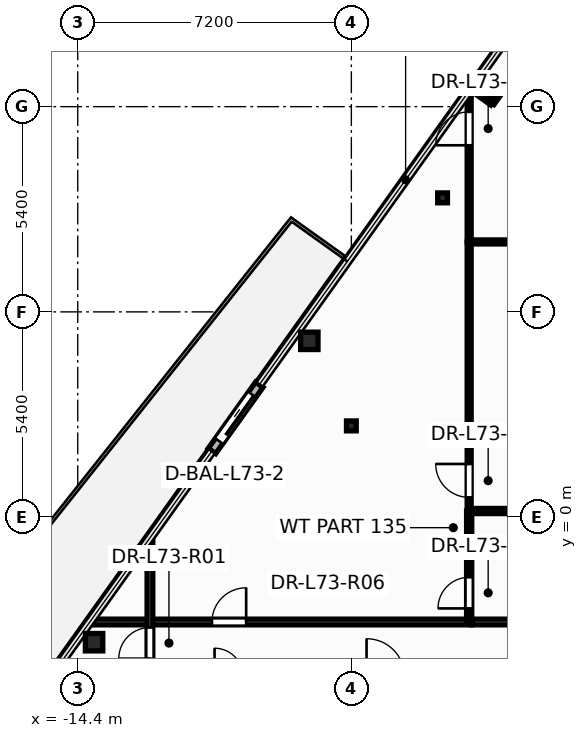
"""IFC4 building model, lengths in metres.
Left out: names, types, materials, properties, quantities, classifications, styles, units other than length and angle.
Written with IfcOpenShell. Run it as: python <this file> out.ifc"""

import sys

from ifc_helpers import new_model, si_unit, direction, frame, frame_2d, origin, origin_2d, place, context, subcontext, project, spatial, rectangle, hollow_circle, i_section, extrude, element, fill, save


model = new_model("IFC4")
c1 = context("Model", 3, precision=1e-05, world=origin(), true_north=direction((0.0, 1.0)))
c2 = subcontext(c1, "Body", "Model", "MODEL_VIEW")
j1 = project(units=[si_unit("LENGTHUNIT", "METRE"), si_unit("PLANEANGLEUNIT", "RADIAN")], contexts=[c1])
p1 = place(None, origin())
s1 = spatial("IfcSite", under=j1, at=p1, CompositionType="ELEMENT")
p2 = place(p1, origin())
s2 = spatial("IfcBuilding", under=s1, at=p2, CompositionType="ELEMENT")
p3 = place(p2, frame((0.0, 0.0, 277.8)))
s3 = spatial("IfcBuildingStorey", under=s2, at=p3, CompositionType="ELEMENT", Elevation=277.8)
for number, where, z_axis, x_axis in (
    (1, (-8.306, 4.638, 0.0), (0.0, 0.0, 1.0), (1.0, 0.0, 0.0)),
    (2, (-13.97, -3.292, 0.0), (0.0, 0.0, 1.0), (1.0, 0.0, 0.0)),
):
    element("IfcColumn", number, at=place(p3, frame(where, z_axis=z_axis, x_axis=x_axis)), inside=s3, PredefinedType="COLUMN", context=c2, shape_type="SweptSolid", body=[
        extrude(hollow_circle(Radius=0.229, WallThickness=0.016, at=origin_2d()), origin(), (0.0, 0.0, 1.0), 3.6),
    ])
for number, where, z_axis, x_axis in (
    (3, (-7.2, 2.4, 0.0), (0.0, 0.0, 1.0), (1.0, 0.0, 0.0)),
    (4, (-4.8, 8.4, 0.0), (0.0, 0.0, 1.0), (1.0, 0.0, 0.0)),
):
    element("IfcColumn", number, at=place(p3, frame(where, z_axis=z_axis, x_axis=x_axis)), inside=s3, PredefinedType="COLUMN", context=c2, shape_type="SweptSolid", body=[
        extrude(i_section(OverallWidth=0.256, OverallDepth=0.26, WebThickness=0.01, FlangeThickness=0.017, at=origin_2d()), origin(), (0.0, 0.0, 1.0), 3.6),
    ])
p4 = place(p3, frame((-9.623, 3.482, -0.015), z_axis=(0.0, 0.0, 1.0), x_axis=(-0.581238193719, -0.813733471207, 0.0)))
e5 = element("IfcWall", 5, at=p4, inside=s3, PredefinedType="STANDARD", context=c2, shape_type="SweptSolid", body=[
    extrude(rectangle(XDim=2.14, YDim=0.24, at=frame_2d((1.07, 0.0))), origin(), (0.0, 0.0, 1.0), 2.878),
])
p5 = place(p4, frame((0.32, 0.0, 0.015)))
e6 = element("IfcOpeningElement", 6, at=p5, cuts=e5, PredefinedType="OPENING", context=c2, shape_type="SweptSolid", body=[
    extrude(rectangle(XDim=1.506, YDim=2.204, at=frame_2d((0.75, 1.102))), frame((0.0, 0.13, 0.0), z_axis=(0.0, -1.0, 0.0), x_axis=(1.0, 0.0, 0.0)), (0.0, 0.0, 1.0), 0.26),
])
p6 = place(p3, frame((-14.082, -2.76, 0.0), z_axis=(0.0, 0.0, 1.0), x_axis=(1.0, 0.0, 0.0)))
e7 = element("IfcWall", 7, at=p6, inside=s3, PredefinedType="PARTITIONING", context=c2, shape_type="SweptSolid", body=[
    extrude(rectangle(XDim=10.042, YDim=0.15, at=frame_2d((5.021, 0.0))), origin(), (0.0, 0.0, 1.0), 2.32),
])
p7 = place(p6, frame((3.214, 0.0, 0.0)))
e8 = element("IfcOpeningElement", 8, at=p7, cuts=e7, PredefinedType="OPENING", context=c2, shape_type="SweptSolid", body=[
    extrude(rectangle(XDim=0.906, YDim=2.104, at=frame_2d((0.45, 1.052))), frame((0.0, 0.085, 0.0), z_axis=(0.0, -1.0, 0.0), x_axis=(1.0, 0.0, 0.0)), (0.0, 0.0, 1.0), 0.17),
])
p8 = place(p3, frame((-4.1, 0.16, 0.0), z_axis=(0.0, 0.0, 1.0), x_axis=(0.0, 1.0, 0.0)))
e9 = element("IfcWall", 9, at=p8, inside=s3, PredefinedType="PARTITIONING", context=c2, shape_type="SweptSolid", body=[
    extrude(rectangle(XDim=7.08, YDim=0.105, at=frame_2d((3.54, 0.0))), origin(), (0.0, 0.0, 1.0), 2.32),
])
p9 = place(p8, frame((0.358, 0.0, 0.0)))
e10 = element("IfcOpeningElement", 10, at=p9, cuts=e9, PredefinedType="OPENING", context=c2, shape_type="SweptSolid", body=[
    extrude(rectangle(XDim=0.886, YDim=2.104, at=frame_2d((0.44, 1.052))), frame((0.0, 0.062, 0.0), z_axis=(0.0, -1.0, 0.0), x_axis=(1.0, 0.0, 0.0)), (0.0, 0.0, 1.0), 0.125),
])
p10 = place(p3, frame((-4.1, 7.24, 0.0), z_axis=(0.0, 0.0, 1.0), x_axis=(0.0, 1.0, 0.0)))
e11 = element("IfcWall", 11, at=p10, inside=s3, PredefinedType="PARTITIONING", context=c2, shape_type="SweptSolid", body=[
    extrude(rectangle(XDim=4.24, YDim=0.105, at=frame_2d((2.12, 0.0))), origin(), (0.0, 0.0, 1.0), 2.718),
])
p11 = place(p10, frame((2.543, 0.0, 0.0)))
e12 = element("IfcOpeningElement", 12, at=p11, cuts=e11, PredefinedType="OPENING", context=c2, shape_type="SweptSolid", body=[
    extrude(rectangle(XDim=0.886, YDim=2.104, at=frame_2d((0.44, 1.052))), frame((0.0, 0.062, 0.0), z_axis=(0.0, -1.0, 0.0), x_axis=(1.0, 0.0, 0.0)), (0.0, 0.0, 1.0), 0.125),
])
p12 = place(p3, frame((-12.5, -4.24, 0.0), z_axis=(0.0, 0.0, 1.0), x_axis=(0.0, 1.0, 0.0)))
e13 = element("IfcWall", 13, at=p12, inside=s3, PredefinedType="PARTITIONING", context=c2, shape_type="SweptSolid", body=[
    extrude(rectangle(XDim=3.695, YDim=0.15, at=frame_2d((1.848, 0.0))), origin(), (0.0, 0.0, 1.0), 2.32),
])
p13 = place(p12, frame((0.516, 0.0, 0.0)))
e14 = element("IfcOpeningElement", 14, at=p13, cuts=e13, PredefinedType="OPENING", context=c2, shape_type="SweptSolid", body=[
    extrude(rectangle(XDim=0.826, YDim=2.104, at=frame_2d((0.41, 1.052))), frame((0.0, 0.085, 0.0), z_axis=(0.0, -1.0, 0.0), x_axis=(1.0, 0.0, 0.0)), (0.0, 0.0, 1.0), 0.17),
])
p14 = place(p3, frame((-4.1, -2.76, 0.0), z_axis=(0.0, 0.0, 1.0), x_axis=(0.0, 1.0, 0.0)))
e15 = element("IfcWall", 15, at=p14, inside=s3, PredefinedType="PARTITIONING", context=c2, shape_type="SweptSolid", body=[
    extrude(rectangle(XDim=2.92, YDim=0.135, at=frame_2d((1.46, 0.0))), origin(), (0.0, 0.0, 1.0), 3.345),
])
p15 = place(p14, frame((0.357, 0.0, 0.0)))
e16 = element("IfcOpeningElement", 16, at=p15, cuts=e15, PredefinedType="OPENING", context=c2, shape_type="SweptSolid", body=[
    extrude(rectangle(XDim=0.826, YDim=2.104, at=frame_2d((0.41, 1.052))), frame((0.0, 0.078, 0.0), z_axis=(0.0, -1.0, 0.0), x_axis=(1.0, 0.0, 0.0)), (0.0, 0.0, 1.0), 0.155),
])
p16 = place(p3, frame((-2.043, 12.925, 0.0), z_axis=(0.0, 0.0, 1.0), x_axis=(-0.581247437607, -0.813726868351, 0.0)))
e17 = element("IfcWall", 17, at=p16, inside=s3, PredefinedType="PARTITIONING", context=c2, shape_type="SweptSolid", body=[
    extrude(rectangle(XDim=2.498, YDim=0.12, at=frame_2d((1.249, 0.0))), origin(), (0.0, 0.0, 1.0), 2.718),
])
p17 = place(p3, frame((-4.038, -2.76, 0.0), z_axis=(0.0, 0.0, 1.0), x_axis=(1.0, 0.0, 0.0)))
e18 = element("IfcWall", 18, at=p17, inside=s3, PredefinedType="PARTITIONING", context=c2, shape_type="SweptSolid", body=[
    extrude(rectangle(XDim=1.678, YDim=0.15, at=frame_2d((0.839, 0.0))), origin(), (0.0, 0.0, 1.0), 2.964),
])
p18 = place(p3, frame((-4.1, 0.16, 0.0), z_axis=(0.0, 0.0, 1.0), x_axis=(1.0, 0.0, 0.0)))
e19 = element("IfcWall", 19, at=p18, inside=s3, PredefinedType="PARTITIONING", context=c2, shape_type="SweptSolid", body=[
    extrude(rectangle(XDim=1.74, YDim=0.135, at=frame_2d((0.87, 0.0))), origin(), (0.0, 0.0, 1.0), 2.964),
])
p19 = place(p3, frame((-4.1, 7.24, 0.0), z_axis=(0.0, 0.0, 1.0), x_axis=(1.0, 0.0, 0.0)))
e20 = element("IfcWall", 20, at=p19, inside=s3, PredefinedType="PARTITIONING", context=c2, shape_type="SweptSolid", body=[
    extrude(rectangle(XDim=1.74, YDim=0.105, at=frame_2d((0.87, 0.0))), origin(), (0.0, 0.0, 1.0), 2.964),
])
p20 = place(p3, frame((-3.495, 10.892, 0.0), z_axis=(0.0, 0.0, 1.0), x_axis=(-0.813733471207, 0.581238193719, 0.0)))
e21 = element("IfcWall", 21, at=p20, inside=s3, PredefinedType="PARTITIONING", context=c2, shape_type="SweptSolid", body=[
    extrude(rectangle(XDim=0.67, YDim=0.12, at=frame_2d((0.335, 0.0))), origin(), (0.0, 0.0, 1.0), 2.718),
])
p21 = place(p5, origin())
e22 = element("IfcDoor", 22, at=p21, inside=s3, OperationType="SLIDING_TO_RIGHT", PredefinedType="DOOR", context=c2, shape_type="SweptSolid", body=[
    extrude(rectangle(XDim=1.5, YDim=2.2, at=frame_2d((0.75, 1.1))), frame((0.0, 0.025, 0.0), z_axis=(0.0, -1.0, 0.0), x_axis=(1.0, 0.0, 0.0)), (0.0, 0.0, 1.0), 0.05),
])
fill(e6, e22)
p22 = place(p13, origin())
e23 = element("IfcDoor", 23, at=p22, inside=s3, OperationType="SINGLE_SWING_LEFT", PredefinedType="DOOR", context=c2, shape_type="SweptSolid", body=[
    extrude(rectangle(XDim=0.82, YDim=2.1, at=frame_2d((0.41, 1.05))), frame((0.0, 0.025, 0.0), z_axis=(0.0, -1.0, 0.0), x_axis=(1.0, 0.0, 0.0)), (0.0, 0.0, 1.0), 0.05),
])
fill(e14, e23)
p23 = place(p15, origin())
e24 = element("IfcDoor", 24, at=p23, inside=s3, OperationType="SINGLE_SWING_LEFT", PredefinedType="DOOR", context=c2, shape_type="SweptSolid", body=[
    extrude(rectangle(XDim=0.82, YDim=2.1, at=frame_2d((0.41, 1.05))), frame((0.0, 0.025, 0.0), z_axis=(0.0, -1.0, 0.0), x_axis=(1.0, 0.0, 0.0)), (0.0, 0.0, 1.0), 0.05),
])
fill(e16, e24)
p24 = place(p9, origin())
e25 = element("IfcDoor", 25, at=p24, inside=s3, OperationType="SINGLE_SWING_RIGHT", PredefinedType="DOOR", context=c2, shape_type="SweptSolid", body=[
    extrude(rectangle(XDim=0.88, YDim=2.1, at=frame_2d((0.44, 1.05))), frame((0.0, 0.025, 0.0), z_axis=(0.0, -1.0, 0.0), x_axis=(1.0, 0.0, 0.0)), (0.0, 0.0, 1.0), 0.05),
])
fill(e10, e25)
p25 = place(p11, origin())
e26 = element("IfcDoor", 26, at=p25, inside=s3, OperationType="SINGLE_SWING_LEFT", PredefinedType="DOOR", context=c2, shape_type="SweptSolid", body=[
    extrude(rectangle(XDim=0.88, YDim=2.1, at=frame_2d((0.44, 1.05))), frame((0.0, 0.025, 0.0), z_axis=(0.0, -1.0, 0.0), x_axis=(1.0, 0.0, 0.0)), (0.0, 0.0, 1.0), 0.05),
])
fill(e12, e26)
p26 = place(p7, origin())
e27 = element("IfcDoor", 27, at=p26, inside=s3, OperationType="SINGLE_SWING_RIGHT", PredefinedType="DOOR", context=c2, shape_type="SweptSolid", body=[
    extrude(rectangle(XDim=0.9, YDim=2.1, at=frame_2d((0.45, 1.05))), frame((0.0, 0.025, 0.0), z_axis=(0.0, -1.0, 0.0), x_axis=(1.0, 0.0, 0.0)), (0.0, 0.0, 1.0), 0.05),
])
fill(e8, e27)
save(model, sys.argv[1])
